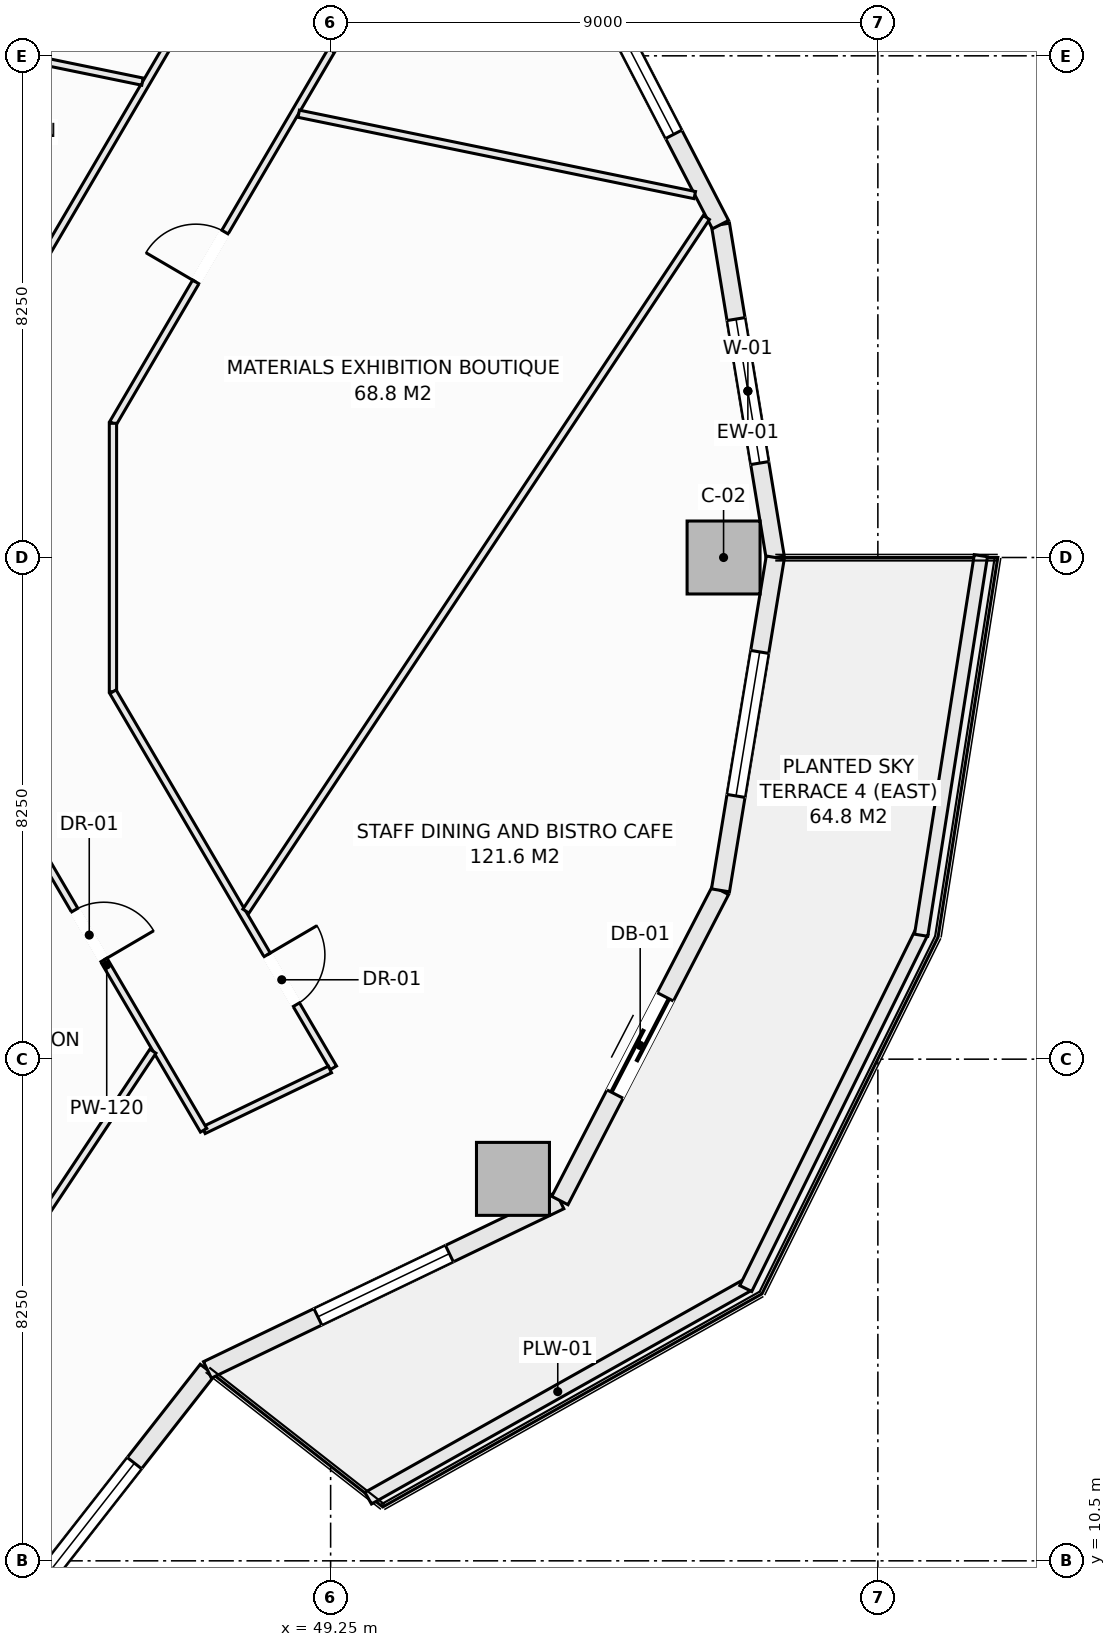
"""IFC4 building model, lengths in metres.
Left out: names, types, materials, properties, quantities, classifications, styles, units other than length and angle.
Written with IfcOpenShell. Run it as: python <this file> out.ifc"""

import sys

from ifc_helpers import new_model, si_unit, direction, frame, frame_2d, origin, origin_2d, place, context, subcontext, project, spatial, rectangle, extrude, element, fill, save


model = new_model("IFC4")
c1 = context("Model", 3, precision=1e-05, world=origin(), true_north=direction((0.0, 1.0)))
c2 = subcontext(c1, "Body", "Model", "MODEL_VIEW")
j1 = project(units=[si_unit("LENGTHUNIT", "METRE"), si_unit("PLANEANGLEUNIT", "RADIAN")], contexts=[c1])
p1 = place(None, origin())
s1 = spatial("IfcSite", under=j1, at=p1, CompositionType="ELEMENT")
p2 = place(p1, origin())
s2 = spatial("IfcBuilding", under=s1, at=p2, CompositionType="ELEMENT")
p3 = place(p2, frame((0.0, 0.0, 57.3)))
s3 = spatial("IfcBuildingStorey", under=s2, at=p3, CompositionType="ELEMENT", Elevation=57.3)
for number, where, z_axis, x_axis in (
    (1, (55.712, 27.0, -0.28), (0.0, 0.0, 1.0), (1.0, 0.0, 0.0)),
    (2, (52.249, 16.781, -0.28), (0.0, 0.0, 1.0), (1.0, 0.0, 0.0)),
):
    element("IfcColumn", number, at=place(p3, frame(where, z_axis=z_axis, x_axis=x_axis)), inside=s3, PredefinedType="COLUMN", context=c2, shape_type="SweptSolid", body=[
        extrude(rectangle(XDim=1.2, YDim=1.2, at=origin_2d()), origin(), (0.0, 0.0, 1.0), 3.85),
    ])
p4 = place(p3, frame((55.662, 32.474, 0.0), z_axis=(0.0, 0.0, 1.0), x_axis=(0.162386212206, -0.986727276447, 0.0)))
e3 = element("IfcWall", 3, at=p4, inside=s3, PredefinedType="SOLIDWALL", context=c2, shape_type="SweptSolid", body=[
    extrude(rectangle(XDim=5.548, YDim=0.3, at=frame_2d((2.774, 0.0))), origin(), (0.0, 0.0, 1.0), 3.093),
])
p5 = place(p4, frame((1.574, 0.0, 0.85)))
e4 = element("IfcOpeningElement", 4, at=p5, cuts=e3, PredefinedType="OPENING", context=c2, shape_type="SweptSolid", body=[
    extrude(rectangle(XDim=2.4, YDim=1.9, at=frame_2d((1.2, 0.95))), frame((0.0, 0.16, 0.0), z_axis=(0.0, -1.0, 0.0), x_axis=(1.0, 0.0, 0.0)), (0.0, 0.0, 1.0), 0.32),
])
p6 = place(p3, frame((53.021, 37.575, 0.0), z_axis=(0.0, 0.0, 1.0), x_axis=(0.459800981414, -0.888021991558, 0.0)))
e5 = element("IfcWall", 5, at=p6, inside=s3, PredefinedType="SOLIDWALL", context=c2, shape_type="SweptSolid", body=[
    extrude(rectangle(XDim=5.744, YDim=0.3, at=frame_2d((2.872, 0.0))), origin(), (0.0, 0.0, 1.0), 3.093),
])
p7 = place(p6, frame((1.672, 0.0, 0.85)))
e6 = element("IfcOpeningElement", 6, at=p7, cuts=e5, PredefinedType="OPENING", context=c2, shape_type="SweptSolid", body=[
    extrude(rectangle(XDim=2.4, YDim=1.9, at=frame_2d((1.2, 0.95))), frame((0.0, 0.16, 0.0), z_axis=(0.0, -1.0, 0.0), x_axis=(1.0, 0.0, 0.0)), (0.0, 0.0, 1.0), 0.32),
])
p8 = place(p3, frame((43.344, 8.684, 0.0), z_axis=(0.0, 0.0, 1.0), x_axis=(0.616434798832, 0.78740595552, 0.0)))
e7 = element("IfcWall", 7, at=p8, inside=s3, PredefinedType="SOLIDWALL", context=c2, shape_type="SweptSolid", body=[
    extrude(rectangle(XDim=6.294, YDim=0.3, at=frame_2d((3.147, 0.0))), origin(), (0.0, 0.0, 1.0), 3.093),
])
p9 = place(p8, frame((1.947, 0.0, 0.85)))
e8 = element("IfcOpeningElement", 8, at=p9, cuts=e7, PredefinedType="OPENING", context=c2, shape_type="SweptSolid", body=[
    extrude(rectangle(XDim=2.4, YDim=1.9, at=frame_2d((1.2, 0.95))), frame((0.0, 0.16, 0.0), z_axis=(0.0, -1.0, 0.0), x_axis=(1.0, 0.0, 0.0)), (0.0, 0.0, 1.0), 0.32),
])
p10 = place(p3, frame((47.224, 13.64, 0.0), z_axis=(0.0, 0.0, 1.0), x_axis=(0.901354747727, 0.433081538224, 0.0)))
e9 = element("IfcWall", 9, at=p10, inside=s3, PredefinedType="SOLIDWALL", context=c2, shape_type="SweptSolid", body=[
    extrude(rectangle(XDim=6.431, YDim=0.3, at=frame_2d((3.215, 0.0))), origin(), (0.0, 0.0, 1.0), 3.093),
])
p11 = place(p10, frame((2.015, 0.0, 0.85)))
e10 = element("IfcOpeningElement", 10, at=p11, cuts=e9, PredefinedType="OPENING", context=c2, shape_type="SweptSolid", body=[
    extrude(rectangle(XDim=2.4, YDim=1.9, at=frame_2d((1.2, 0.95))), frame((0.0, 0.16, 0.0), z_axis=(0.0, -1.0, 0.0), x_axis=(1.0, 0.0, 0.0)), (0.0, 0.0, 1.0), 0.32),
])
p12 = place(p3, frame((53.021, 16.425, 0.0), z_axis=(0.0, 0.0, 1.0), x_axis=(0.459800981414, 0.888021991558, 0.0)))
e11 = element("IfcWall", 11, at=p12, inside=s3, PredefinedType="SOLIDWALL", context=c2, shape_type="SweptSolid", body=[
    extrude(rectangle(XDim=5.744, YDim=0.3, at=frame_2d((2.872, 0.0))), origin(), (0.0, 0.0, 1.0), 3.093),
])
p13 = place(p12, frame((1.972, 0.0, 0.0)))
e12 = element("IfcOpeningElement", 12, at=p13, cuts=e11, PredefinedType="OPENING", context=c2, shape_type="SweptSolid", body=[
    extrude(rectangle(XDim=1.8, YDim=2.25, at=frame_2d((0.9, 1.125))), frame((0.0, 0.16, 0.0), z_axis=(0.0, -1.0, 0.0), x_axis=(1.0, 0.0, 0.0)), (0.0, 0.0, 1.0), 0.32),
])
p14 = place(p3, frame((55.662, 21.526, 0.0), z_axis=(0.0, 0.0, 1.0), x_axis=(0.162386212206, 0.986727276447, 0.0)))
e13 = element("IfcWall", 13, at=p14, inside=s3, PredefinedType="SOLIDWALL", context=c2, shape_type="SweptSolid", body=[
    extrude(rectangle(XDim=5.548, YDim=0.3, at=frame_2d((2.774, 0.0))), origin(), (0.0, 0.0, 1.0), 3.093),
])
p15 = place(p14, frame((1.574, 0.0, 0.85)))
e14 = element("IfcOpeningElement", 14, at=p15, cuts=e13, PredefinedType="OPENING", context=c2, shape_type="SweptSolid", body=[
    extrude(rectangle(XDim=2.4, YDim=1.9, at=frame_2d((1.2, 0.95))), frame((0.0, 0.16, 0.0), z_axis=(0.0, -1.0, 0.0), x_axis=(1.0, 0.0, 0.0)), (0.0, 0.0, 1.0), 0.32),
])
p16 = place(p3, frame((49.868, 11.531, 0.0), z_axis=(0.0, 0.0, 1.0), x_axis=(0.871775109335, 0.489906275468, 0.0)))
e15 = element("IfcWall", 15, at=p16, inside=s3, PredefinedType="PARAPET", context=c2, shape_type="SweptSolid", body=[
    extrude(rectangle(XDim=7.152, YDim=0.22, at=frame_2d((3.576, 0.0))), origin(), (0.0, 0.0, 1.0), 0.52),
])
p17 = place(p3, frame((56.077, 14.979, 0.0), z_axis=(0.0, 0.0, 1.0), x_axis=(0.442686636348, 0.89667638644, 0.0)))
e16 = element("IfcWall", 16, at=p17, inside=s3, PredefinedType="PARAPET", context=c2, shape_type="SweptSolid", body=[
    extrude(rectangle(XDim=6.545, YDim=0.22, at=frame_2d((3.272, 0.0))), origin(), (0.0, 0.0, 1.0), 0.52),
])
p18 = place(p3, frame((58.962, 20.788, 0.0), z_axis=(0.0, 0.0, 1.0), x_axis=(0.15545655238, 0.987842730561, 0.0)))
e17 = element("IfcWall", 17, at=p18, inside=s3, PredefinedType="PARAPET", context=c2, shape_type="SweptSolid", body=[
    extrude(rectangle(XDim=6.318, YDim=0.22, at=frame_2d((3.159, 0.0))), origin(), (0.0, 0.0, 1.0), 0.52),
])
p19 = place(p3, frame((44.056, 31.12, 0.0), z_axis=(0.0, 0.0, 1.0), x_axis=(0.505570543943, 0.86278527172, 0.0)))
e18 = element("IfcWall", 18, at=p19, inside=s3, PredefinedType="PARTITIONING", context=c2, shape_type="SweptSolid", body=[
    extrude(rectangle(XDim=6.142, YDim=0.12, at=frame_2d((3.071, 0.0))), origin(), (0.0, 0.0, 1.0), 3.205),
])
p20 = place(p3, frame((45.67, 29.207, 0.0), z_axis=(0.0, 0.0, 1.0), x_axis=(0.505582857323, 0.86277805627, 0.0)))
e19 = element("IfcWall", 19, at=p20, inside=s3, PredefinedType="PARTITIONING", context=c2, shape_type="SweptSolid", body=[
    extrude(rectangle(XDim=7.108, YDim=0.12, at=frame_2d((3.554, 0.0))), origin(), (0.0, 0.0, 1.0), 3.57),
])
p21 = place(p20, frame((2.695, 0.0, 0.0)))
e20 = element("IfcOpeningElement", 20, at=p21, cuts=e19, PredefinedType="OPENING", context=c2, shape_type="SweptSolid", body=[
    extrude(rectangle(XDim=0.95, YDim=2.1, at=frame_2d((0.475, 1.05))), frame((0.0, 0.07, 0.0), z_axis=(0.0, -1.0, 0.0), x_axis=(1.0, 0.0, 0.0)), (0.0, 0.0, 1.0), 0.14),
])
p22 = place(p3, frame((45.67, 24.793, 0.0), z_axis=(0.0, 0.0, 1.0), x_axis=(0.0, 1.0, 0.0)))
e21 = element("IfcWall", 21, at=p22, inside=s3, PredefinedType="PARTITIONING", context=c2, shape_type="SweptSolid", body=[
    extrude(rectangle(XDim=4.414, YDim=0.12, at=frame_2d((2.207, 0.0))), origin(), (0.0, 0.0, 1.0), 3.57),
])
p23 = place(p3, frame((45.67, 24.793, 0.0), z_axis=(0.0, 0.0, 1.0), x_axis=(0.505584917928, -0.862776848764, 0.0)))
e22 = element("IfcWall", 22, at=p23, inside=s3, PredefinedType="PARTITIONING", context=c2, shape_type="SweptSolid", body=[
    extrude(rectangle(XDim=7.17, YDim=0.12, at=frame_2d((3.585, 0.0))), origin(), (0.0, 0.0, 1.0), 3.57),
])
p24 = place(p23, frame((5.016, 0.0, 0.0)))
e23 = element("IfcOpeningElement", 23, at=p24, cuts=e22, PredefinedType="OPENING", context=c2, shape_type="SweptSolid", body=[
    extrude(rectangle(XDim=0.95, YDim=2.1, at=frame_2d((0.475, 1.05))), frame((0.0, 0.07, 0.0), z_axis=(0.0, -1.0, 0.0), x_axis=(1.0, 0.0, 0.0)), (0.0, 0.0, 1.0), 0.14),
])
p25 = place(p3, frame((47.161, 17.581, 0.0), z_axis=(0.0, 0.0, 1.0), x_axis=(0.901265146481, 0.433267972204, 0.0)))
e24 = element("IfcWall", 24, at=p25, inside=s3, PredefinedType="PARTITIONING", context=c2, shape_type="SweptSolid", body=[
    extrude(rectangle(XDim=2.306, YDim=0.12, at=frame_2d((1.153, 0.0))), origin(), (0.0, 0.0, 1.0), 3.57),
])
p26 = place(p3, frame((43.974, 23.02, 0.0), z_axis=(0.0, 0.0, 1.0), x_axis=(0.505531634194, -0.862808070679, 0.0)))
e25 = element("IfcWall", 25, at=p26, inside=s3, PredefinedType="PARTITIONING", context=c2, shape_type="SweptSolid", body=[
    extrude(rectangle(XDim=6.304, YDim=0.12, at=frame_2d((3.152, 0.0))), origin(), (0.0, 0.0, 1.0), 3.205),
])
p27 = place(p26, frame((2.109, 0.0, 0.0)))
e26 = element("IfcOpeningElement", 26, at=p27, cuts=e25, PredefinedType="OPENING", context=c2, shape_type="SweptSolid", body=[
    extrude(rectangle(XDim=0.95, YDim=2.1, at=frame_2d((0.475, 1.05))), frame((0.0, 0.07, 0.0), z_axis=(0.0, -1.0, 0.0), x_axis=(1.0, 0.0, 0.0)), (0.0, 0.0, 1.0), 0.14),
])
p28 = place(p3, frame((40.951, 10.783, 0.0), z_axis=(0.0, 0.0, 1.0), x_axis=(0.553122636923, 0.83309984307, 0.0)))
e27 = element("IfcWall", 27, at=p28, inside=s3, PredefinedType="PARTITIONING", context=c2, shape_type="SweptSolid", body=[
    extrude(rectangle(XDim=9.72, YDim=0.12, at=frame_2d((4.86, 0.0))), origin(), (0.0, 0.0, 1.0), 3.57),
])
p29 = place(p3, frame((47.856, 21.185, 0.0), z_axis=(0.0, 0.0, 1.0), x_axis=(0.553102657985, 0.833113107405, 0.0)))
e28 = element("IfcWall", 28, at=p29, inside=s3, PredefinedType="PARTITIONING", context=c2, shape_type="SweptSolid", body=[
    extrude(rectangle(XDim=13.692, YDim=0.12, at=frame_2d((6.846, 0.0))), origin(), (0.0, 0.0, 1.0), 3.57),
])
p30 = place(p3, frame((29.842, 38.177, 0.0), z_axis=(0.0, 0.0, 1.0), x_axis=(0.979543984113, -0.201230174647, 0.0)))
e29 = element("IfcWall", 29, at=p30, inside=s3, PredefinedType="PARTITIONING", context=c2, shape_type="SweptSolid", body=[
    extrude(rectangle(XDim=16.654, YDim=0.12, at=frame_2d((8.327, 0.0))), origin(), (0.0, 0.0, 1.0), 2.934),
])
p31 = place(p3, frame((48.725, 34.298, 0.0), z_axis=(0.0, 0.0, 1.0), x_axis=(0.979545031046, -0.201225078339, 0.0)))
e30 = element("IfcWall", 30, at=p31, inside=s3, PredefinedType="PARTITIONING", context=c2, shape_type="SweptSolid", body=[
    extrude(rectangle(XDim=6.65, YDim=0.12, at=frame_2d((3.325, 0.0))), origin(), (0.0, 0.0, 1.0), 3.57),
])
p32 = place(p5, origin())
e31 = element("IfcWindow", 31, at=p32, inside=s3, PartitioningType="SINGLE_PANEL", PredefinedType="WINDOW", context=c2, shape_type="SweptSolid", body=[
    extrude(rectangle(XDim=2.4, YDim=1.9, at=frame_2d((1.2, 0.95))), frame((0.0, 0.03, 0.0), z_axis=(0.0, -1.0, 0.0), x_axis=(1.0, 0.0, 0.0)), (0.0, 0.0, 1.0), 0.06),
])
fill(e4, e31)
p33 = place(p7, origin())
e32 = element("IfcWindow", 32, at=p33, inside=s3, PartitioningType="SINGLE_PANEL", PredefinedType="WINDOW", context=c2, shape_type="SweptSolid", body=[
    extrude(rectangle(XDim=2.4, YDim=1.9, at=frame_2d((1.2, 0.95))), frame((0.0, 0.03, 0.0), z_axis=(0.0, -1.0, 0.0), x_axis=(1.0, 0.0, 0.0)), (0.0, 0.0, 1.0), 0.06),
])
fill(e6, e32)
p34 = place(p9, origin())
e33 = element("IfcWindow", 33, at=p34, inside=s3, PartitioningType="SINGLE_PANEL", PredefinedType="WINDOW", context=c2, shape_type="SweptSolid", body=[
    extrude(rectangle(XDim=2.4, YDim=1.9, at=frame_2d((1.2, 0.95))), frame((0.0, 0.03, 0.0), z_axis=(0.0, -1.0, 0.0), x_axis=(1.0, 0.0, 0.0)), (0.0, 0.0, 1.0), 0.06),
])
fill(e8, e33)
p35 = place(p11, origin())
e34 = element("IfcWindow", 34, at=p35, inside=s3, PartitioningType="SINGLE_PANEL", PredefinedType="WINDOW", context=c2, shape_type="SweptSolid", body=[
    extrude(rectangle(XDim=2.4, YDim=1.9, at=frame_2d((1.2, 0.95))), frame((0.0, 0.03, 0.0), z_axis=(0.0, -1.0, 0.0), x_axis=(1.0, 0.0, 0.0)), (0.0, 0.0, 1.0), 0.06),
])
fill(e10, e34)
p36 = place(p13, frame((1.8, 0.0, 0.0), z_axis=(0.0, 0.0, 1.0), x_axis=(-1.0, 0.0, 0.0)))
e35 = element("IfcDoor", 35, at=p36, inside=s3, OperationType="SLIDING_TO_LEFT", PredefinedType="DOOR", context=c2, shape_type="SweptSolid", body=[
    extrude(rectangle(XDim=1.8, YDim=2.25, at=frame_2d((0.9, 1.125))), frame((0.0, 0.025, 0.0), z_axis=(0.0, -1.0, 0.0), x_axis=(1.0, 0.0, 0.0)), (0.0, 0.0, 1.0), 0.05),
])
fill(e12, e35)
p37 = place(p15, origin())
e36 = element("IfcWindow", 36, at=p37, inside=s3, PartitioningType="SINGLE_PANEL", PredefinedType="WINDOW", context=c2, shape_type="SweptSolid", body=[
    extrude(rectangle(XDim=2.4, YDim=1.9, at=frame_2d((1.2, 0.95))), frame((0.0, 0.03, 0.0), z_axis=(0.0, -1.0, 0.0), x_axis=(1.0, 0.0, 0.0)), (0.0, 0.0, 1.0), 0.06),
])
fill(e14, e36)
p38 = place(p27, origin())
e37 = element("IfcDoor", 37, at=p38, inside=s3, OperationType="SINGLE_SWING_RIGHT", PredefinedType="DOOR", context=c2, shape_type="SweptSolid", body=[
    extrude(rectangle(XDim=0.95, YDim=2.1, at=frame_2d((0.475, 1.05))), frame((0.0, 0.025, 0.0), z_axis=(0.0, -1.0, 0.0), x_axis=(1.0, 0.0, 0.0)), (0.0, 0.0, 1.0), 0.05),
])
fill(e26, e37)
p39 = place(p24, origin())
e38 = element("IfcDoor", 38, at=p39, inside=s3, OperationType="SINGLE_SWING_LEFT", PredefinedType="DOOR", context=c2, shape_type="SweptSolid", body=[
    extrude(rectangle(XDim=0.95, YDim=2.1, at=frame_2d((0.475, 1.05))), frame((0.0, 0.025, 0.0), z_axis=(0.0, -1.0, 0.0), x_axis=(1.0, 0.0, 0.0)), (0.0, 0.0, 1.0), 0.05),
])
fill(e23, e38)
p40 = place(p21, origin())
e39 = element("IfcDoor", 39, at=p40, inside=s3, OperationType="SINGLE_SWING_LEFT", PredefinedType="DOOR", context=c2, shape_type="SweptSolid", body=[
    extrude(rectangle(XDim=0.95, YDim=2.1, at=frame_2d((0.475, 1.05))), frame((0.0, 0.025, 0.0), z_axis=(0.0, -1.0, 0.0), x_axis=(1.0, 0.0, 0.0)), (0.0, 0.0, 1.0), 0.05),
])
fill(e20, e39)
save(model, sys.argv[1])
